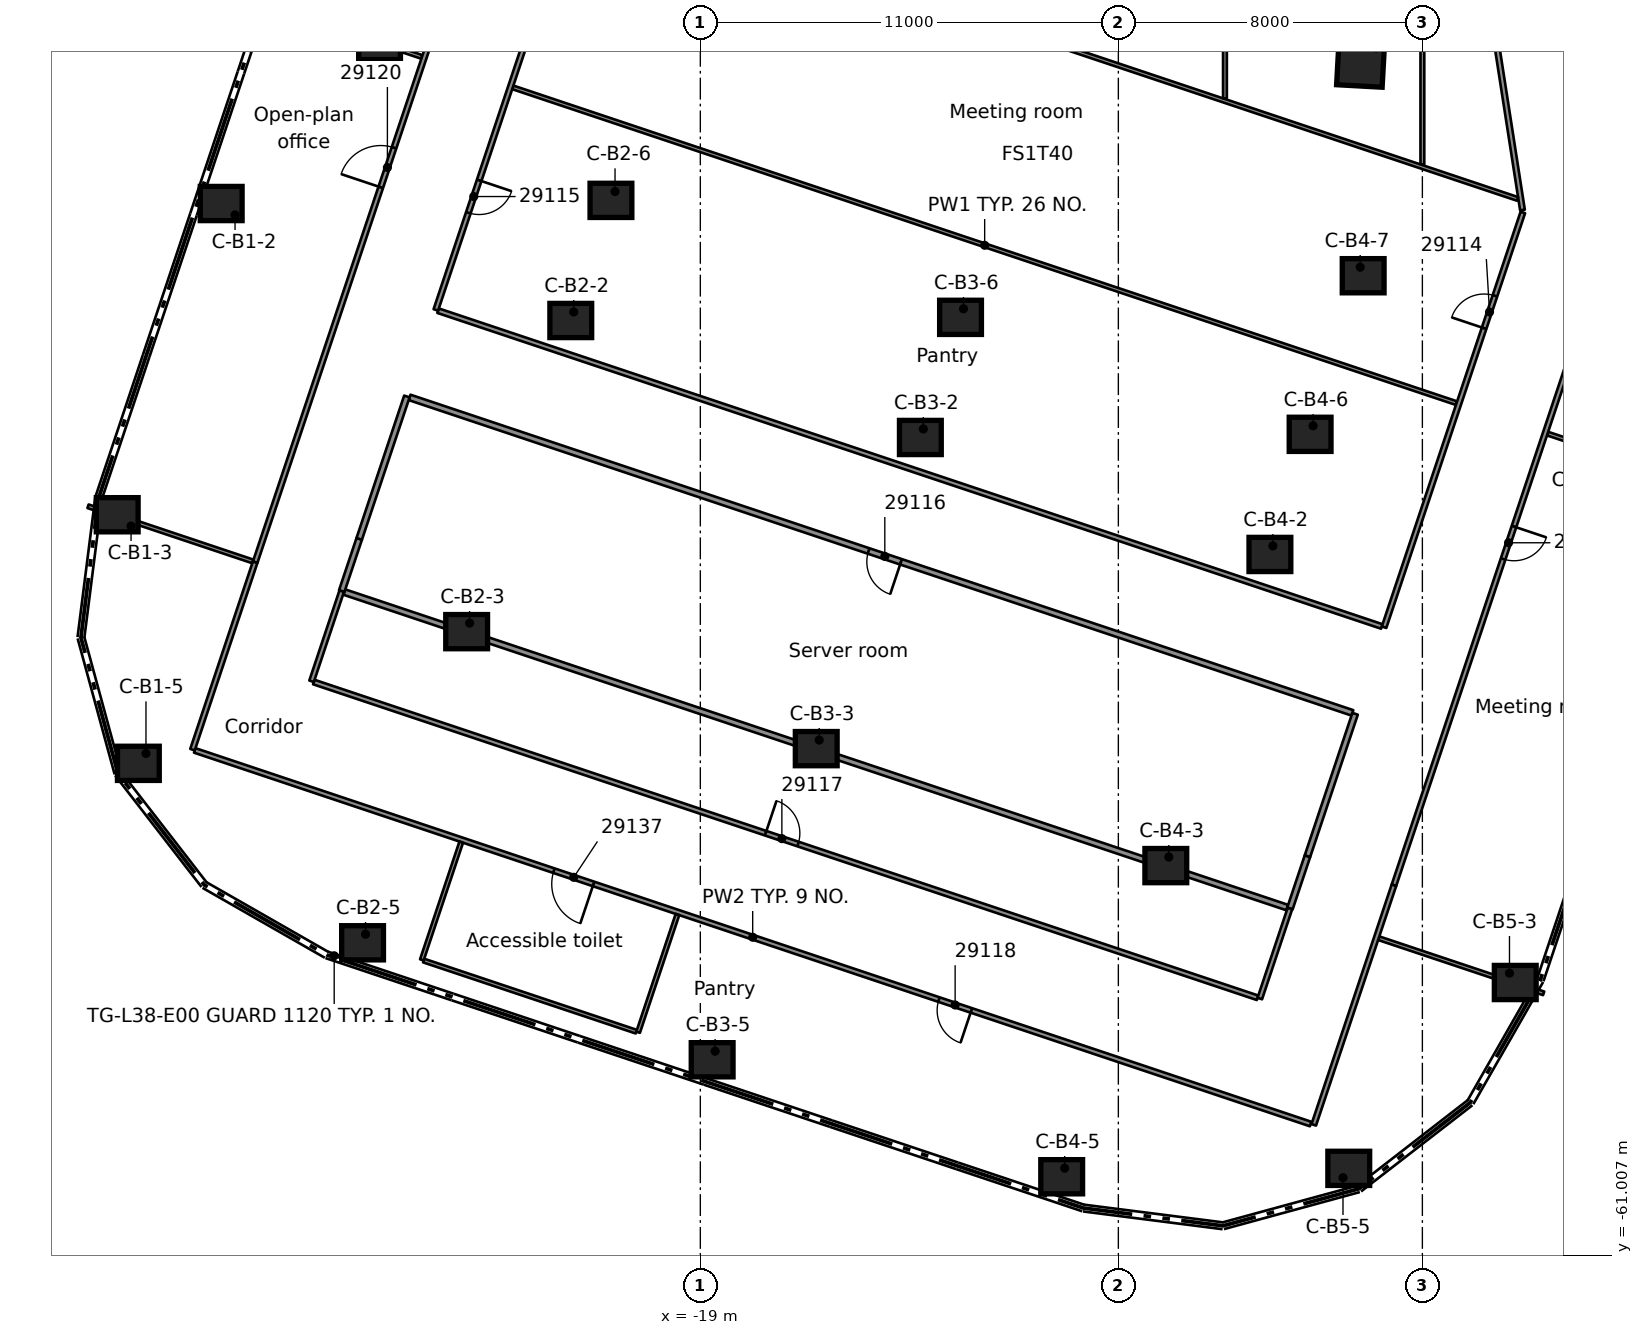
"""IFC4 building model, lengths in metres.
Left out: names, types, materials, properties, quantities, classifications, styles, units other than length and angle.
Written with IfcOpenShell. Run it as: python <this file> out.ifc"""

import sys

from ifc_helpers import new_model, si_unit, direction, frame, frame_2d, origin, origin_2d, place, context, subcontext, project, spatial, rectangle, extrude, element, fill, save


model = new_model("IFC4")
c1 = context("Model", 3, precision=1e-05, world=origin(), true_north=direction((0.0, 1.0)))
c2 = subcontext(c1, "Body", "Model", "MODEL_VIEW")
j1 = project(units=[si_unit("LENGTHUNIT", "METRE"), si_unit("PLANEANGLEUNIT", "RADIAN")], contexts=[c1])
p1 = place(None, origin())
s1 = spatial("IfcSite", under=j1, at=p1, CompositionType="ELEMENT")
p2 = place(p1, origin())
s2 = spatial("IfcBuilding", under=s1, at=p2, CompositionType="ELEMENT")
p3 = place(p2, frame((0.0, 0.0, 149.1)))
s3 = spatial("IfcBuildingStorey", under=s2, at=p3, CompositionType="ELEMENT", Elevation=149.1)
for number, where, z_axis, x_axis in (
    (1, (-31.608, -33.326, 0.0), (0.0, 0.0, 1.0), (1.0, 0.0, 0.0)),
    (2, (-34.344, -41.515, 0.0), (0.0, 0.0, 1.0), (1.0, 0.0, 0.0)),
    (3, (-33.788, -48.056, 0.0), (0.0, 0.0, 1.0), (1.0, 0.0, 0.0)),
    (4, (-27.441, -29.089, 0.0), (0.0, 0.0, 1.0), (1.0, 0.0, 0.0)),
    (5, (-22.409, -36.404, 0.0), (0.0, 0.0, 1.0), (1.0, 0.0, 0.0)),
    (6, (-25.149, -44.591, 0.0), (0.0, 0.0, 1.0), (1.0, 0.0, 0.0)),
    (7, (-27.888, -52.778, 0.0), (0.0, 0.0, 1.0), (1.0, 0.0, 0.0)),
    (8, (-21.352, -33.243, 0.0), (0.0, 0.0, 1.0), (1.0, 0.0, 0.0)),
    (9, (-13.21, -39.482, 0.0), (0.0, 0.0, 1.0), (1.0, 0.0, 0.0)),
    (10, (-15.95, -47.669, 0.0), (0.0, 0.0, 1.0), (1.0, 0.0, 0.0)),
    (11, (-18.689, -55.856, 0.0), (0.0, 0.0, 1.0), (1.0, 0.0, 0.0)),
    (12, (-12.153, -36.321, 0.0), (0.0, 0.0, 1.0), (1.0, 0.0, 0.0)),
    (13, (-4.012, -42.56, 0.0), (0.0, 0.0, 1.0), (1.0, 0.0, 0.0)),
    (14, (-6.751, -50.747, 0.0), (0.0, 0.0, 1.0), (1.0, 0.0, 0.0)),
    (15, (-9.491, -58.934, 0.0), (0.0, 0.0, 1.0), (1.0, 0.0, 0.0)),
    (16, (-2.954, -39.399, 0.0), (0.0, 0.0, 1.0), (1.0, 0.0, 0.0)),
    (17, (-1.558, -35.226, 0.0), (0.0, 0.0, 1.0), (1.0, 0.0, 0.0)),
    (18, (2.444, -53.823, 0.0), (0.0, 0.0, 1.0), (1.0, 0.0, 0.0)),
    (19, (-1.937, -58.713, 0.0), (0.0, 0.0, 1.0), (1.0, 0.0, 0.0)),
):
    element("IfcColumn", number, at=place(p3, frame(where, z_axis=z_axis, x_axis=x_axis)), inside=s3, PredefinedType="COLUMN", context=c2, shape_type="SweptSolid", body=[
        extrude(rectangle(XDim=1.1, YDim=0.9, at=origin_2d()), origin(), (0.0, 0.0, 1.0), 3.5),
    ])
p4 = place(p3, frame((-1.625, -29.634, 0.0), z_axis=(0.0, 0.0, 1.0), x_axis=(-0.054758482756, -0.998499628726, 0.0)))
e20 = element("IfcColumn", 20, at=p4, inside=s3, PredefinedType="COLUMN", context=c2, shape_type="SweptSolid", body=[
    extrude(rectangle(XDim=1.2, YDim=1.2, at=origin_2d()), origin(), (0.0, 0.0, 1.0), 3.5),
])
p5 = place(p3, frame((2.634, -33.497, 0.0), z_axis=(0.0, 0.0, 1.0), x_axis=(-0.153972826204, 0.988075082567, 0.0)))
e21 = element("IfcWall", 21, at=p5, inside=s3, PredefinedType="PARTITIONING", context=c2, shape_type="SweptSolid", body=[
    extrude(rectangle(XDim=4.424, YDim=0.125, at=frame_2d((2.212, 0.0))), origin(), (0.0, 0.0, 1.0), 3.08),
])
p6 = place(p3, frame((-26.281, -53.245, 0.0), z_axis=(0.0, 0.0, 1.0), x_axis=(0.948351779966, -0.317220587976, 0.0)))
e22 = element("IfcWall", 22, at=p6, inside=s3, PredefinedType="PARTITIONING", context=c2, shape_type="SweptSolid", body=[
    extrude(rectangle(XDim=5.901, YDim=0.1, at=frame_2d((2.95, 0.0))), origin(), (0.0, 0.0, 1.0), 3.08),
])
p7 = place(p3, frame((-2.94, -57.547, 0.0), z_axis=(0.0, 0.0, 1.0), x_axis=(-0.948265401731, 0.317478704609, 0.0)))
e23 = element("IfcWall", 23, at=p7, inside=s3, PredefinedType="PARTITIONING", context=c2, shape_type="SweptSolid", body=[
    extrude(rectangle(XDim=30.966, YDim=0.125, at=frame_2d((15.483, 0.0))), origin(), (0.0, 0.0, 1.0), 3.08),
])
p8 = place(p7, frame((9.415, 0.0, 0.0)))
e24 = element("IfcOpeningElement", 24, at=p8, cuts=e23, PredefinedType="OPENING", context=c2, shape_type="SweptSolid", body=[
    extrude(rectangle(XDim=0.9, YDim=2.1, at=frame_2d((0.45, 1.05))), frame((0.0, 0.073, 0.0), z_axis=(0.0, -1.0, 0.0), x_axis=(1.0, 0.0, 0.0)), (0.0, 0.0, 1.0), 0.145),
])
p9 = place(p7, frame((19.9, 0.0, 0.0)))
e25 = element("IfcOpeningElement", 25, at=p9, cuts=e23, PredefinedType="OPENING", context=c2, shape_type="SweptSolid", body=[
    extrude(rectangle(XDim=1.1, YDim=2.1, at=frame_2d((0.55, 1.05))), frame((0.0, 0.073, 0.0), z_axis=(0.0, -1.0, 0.0), x_axis=(1.0, 0.0, 0.0)), (0.0, 0.0, 1.0), 0.145),
])
p10 = place(p3, frame((-29.171, -45.917, 0.0), z_axis=(0.0, 0.0, 1.0), x_axis=(0.948337781815, -0.317262433299, 0.0)))
e26 = element("IfcWall", 26, at=p10, inside=s3, PredefinedType="PARTITIONING", context=c2, shape_type="SweptSolid", body=[
    extrude(rectangle(XDim=26.187, YDim=0.125, at=frame_2d((13.093, 0.0))), origin(), (0.0, 0.0, 1.0), 3.08),
])
p11 = place(p10, frame((12.538, 0.0, 0.0)))
e27 = element("IfcOpeningElement", 27, at=p11, cuts=e26, PredefinedType="OPENING", context=c2, shape_type="SweptSolid", body=[
    extrude(rectangle(XDim=0.9, YDim=2.1, at=frame_2d((0.45, 1.05))), frame((0.0, 0.073, 0.0), z_axis=(0.0, -1.0, 0.0), x_axis=(1.0, 0.0, 0.0)), (0.0, 0.0, 1.0), 0.145),
])
p12 = place(p3, frame((-35.112, -41.292, 0.0), z_axis=(0.0, 0.0, 1.0), x_axis=(0.94831984375, -0.317316047419, 0.0)))
e28 = element("IfcWall", 28, at=p12, inside=s3, PredefinedType="PARTITIONING", context=c2, shape_type="SweptSolid", body=[
    extrude(rectangle(XDim=4.576, YDim=0.1, at=frame_2d((2.288, 0.0))), origin(), (0.0, 0.0, 1.0), 3.08),
])
p13 = place(p3, frame((-28.366, -43.55, 0.0), z_axis=(0.0, 0.0, 1.0), x_axis=(0.948327152728, -0.317294203223, 0.0)))
e29 = element("IfcWall", 29, at=p13, inside=s3, PredefinedType="PARTITIONING", context=c2, shape_type="SweptSolid", body=[
    extrude(rectangle(XDim=26.162, YDim=0.15, at=frame_2d((13.081, 0.0))), origin(), (0.0, 0.0, 1.0), 3.08),
])
p14 = place(p3, frame((-1.149, -52.657, 0.0), z_axis=(0.0, 0.0, 1.0), x_axis=(0.948400148701, -0.317075949805, 0.0)))
e30 = element("IfcWall", 30, at=p14, inside=s3, PredefinedType="PARTITIONING", context=c2, shape_type="SweptSolid", body=[
    extrude(rectangle(XDim=4.576, YDim=0.1, at=frame_2d((2.288, 0.0))), origin(), (0.0, 0.0, 1.0), 3.08),
])
p15 = place(p3, frame((-1.841, -46.728, 0.0), z_axis=(0.0, 0.0, 1.0), x_axis=(-0.94832621322, 0.317297011205, 0.0)))
e31 = element("IfcWall", 31, at=p15, inside=s3, PredefinedType="PARTITIONING", context=c2, shape_type="SweptSolid", body=[
    extrude(rectangle(XDim=26.162, YDim=0.15, at=frame_2d((13.081, 0.0))), origin(), (0.0, 0.0, 1.0), 3.08),
])
p16 = place(p15, frame((12.525, 0.0, 0.0)))
e32 = element("IfcOpeningElement", 32, at=p16, cuts=e31, PredefinedType="OPENING", context=c2, shape_type="SweptSolid", body=[
    extrude(rectangle(XDim=0.9, YDim=2.1, at=frame_2d((0.45, 1.05))), frame((0.0, 0.085, 0.0), z_axis=(0.0, -1.0, 0.0), x_axis=(1.0, 0.0, 0.0)), (0.0, 0.0, 1.0), 0.17),
])
p17 = place(p3, frame((-25.901, -36.146, 0.0), z_axis=(0.0, 0.0, 1.0), x_axis=(0.948326561211, -0.317295971139, 0.0)))
e33 = element("IfcWall", 33, at=p17, inside=s3, PredefinedType="PARTITIONING", context=c2, shape_type="SweptSolid", body=[
    extrude(rectangle(XDim=26.187, YDim=0.125, at=frame_2d((13.094, 0.0))), origin(), (0.0, 0.0, 1.0), 3.08),
])
p18 = place(p3, frame((-30.722, -27.999, 0.0), z_axis=(0.0, 0.0, 1.0), x_axis=(0.948355935611, -0.317208164132, 0.0)))
e34 = element("IfcWall", 34, at=p18, inside=s3, PredefinedType="PARTITIONING", context=c2, shape_type="SweptSolid", body=[
    extrude(rectangle(XDim=4.631, YDim=0.1, at=frame_2d((2.315, 0.0))), origin(), (0.0, 0.0, 1.0), 3.08),
])
p19 = place(p3, frame((-23.935, -30.27, 0.0), z_axis=(0.0, 0.0, 1.0), x_axis=(0.948326561211, -0.317295971139, 0.0)))
e35 = element("IfcWall", 35, at=p19, inside=s3, PredefinedType="PARTITIONING", context=c2, shape_type="SweptSolid", body=[
    extrude(rectangle(XDim=26.187, YDim=0.1, at=frame_2d((13.094, 0.0))), origin(), (0.0, 0.0, 1.0), 3.08),
])
p20 = place(p3, frame((3.294, -39.38, 0.0), z_axis=(0.0, 0.0, 1.0), x_axis=(0.948260676976, -0.317492816455, 0.0)))
e36 = element("IfcWall", 36, at=p20, inside=s3, PredefinedType="PARTITIONING", context=c2, shape_type="SweptSolid", body=[
    extrude(rectangle(XDim=4.631, YDim=0.1, at=frame_2d((2.315, 0.0))), origin(), (0.0, 0.0, 1.0), 3.08),
])
p21 = place(p3, frame((-21.98, -25.012, 0.0), z_axis=(0.0, 0.0, 1.0), x_axis=(0.948312916699, -0.317336748614, 0.0)))
e37 = element("IfcWall", 37, at=p21, inside=s3, PredefinedType="PARTITIONING", context=c2, shape_type="SweptSolid", body=[
    extrude(rectangle(XDim=25.818, YDim=0.1, at=frame_2d((12.909, 0.0))), origin(), (0.0, 0.0, 1.0), 3.08),
])
p22 = place(p3, frame((-2.858, -57.568, 0.0), z_axis=(0.0, 0.0, 1.0), x_axis=(0.317328623894, 0.94831563546, 0.0)))
e38 = element("IfcWall", 38, at=p22, inside=s3, PredefinedType="PARTITIONING", context=c2, shape_type="SweptSolid", body=[
    extrude(rectangle(XDim=6.652, YDim=0.125, at=frame_2d((3.326, 0.0))), origin(), (0.0, 0.0, 1.0), 3.08),
])
p23 = place(p3, frame((5.014, -34.047, 0.0), z_axis=(0.0, 0.0, 1.0), x_axis=(-0.317385597106, -0.948296568986, 0.0)))
e39 = element("IfcWall", 39, at=p23, inside=s3, PredefinedType="PARTITIONING", context=c2, shape_type="SweptSolid", body=[
    extrude(rectangle(XDim=18.151, YDim=0.125, at=frame_2d((9.076, 0.0))), origin(), (0.0, 0.0, 1.0), 3.08),
])
p24 = place(p23, frame((2.347, 0.0, 0.0)))
e40 = element("IfcOpeningElement", 40, at=p24, cuts=e39, PredefinedType="OPENING", context=c2, shape_type="SweptSolid", body=[
    extrude(rectangle(XDim=0.9, YDim=2.1, at=frame_2d((0.45, 1.05))), frame((0.0, 0.073, 0.0), z_axis=(0.0, -1.0, 0.0), x_axis=(1.0, 0.0, 0.0)), (0.0, 0.0, 1.0), 0.145),
])
p25 = place(p23, frame((8.203, 0.0, 0.0)))
e41 = element("IfcOpeningElement", 41, at=p25, cuts=e39, PredefinedType="OPENING", context=c2, shape_type="SweptSolid", body=[
    extrude(rectangle(XDim=0.9, YDim=2.1, at=frame_2d((0.45, 1.05))), frame((0.0, 0.073, 0.0), z_axis=(0.0, -1.0, 0.0), x_axis=(1.0, 0.0, 0.0)), (0.0, 0.0, 1.0), 0.145),
])
p26 = place(p3, frame((-3.485, -51.875, 0.0), z_axis=(0.0, 0.0, 1.0), x_axis=(0.317791901712, 0.948160485997, 0.0)))
e42 = element("IfcWall", 42, at=p26, inside=s3, PredefinedType="PARTITIONING", context=c2, shape_type="SweptSolid", body=[
    extrude(rectangle(XDim=1.451, YDim=0.15, at=frame_2d((0.726, 0.0))), origin(), (0.0, 0.0, 1.0), 3.08),
])
p27 = place(p3, frame((-4.278, -54.245, 0.0), z_axis=(0.0, 0.0, 1.0), x_axis=(0.31728257411, 0.948331043553, 0.0)))
e43 = element("IfcWall", 43, at=p27, inside=s3, PredefinedType="PARTITIONING", context=c2, shape_type="SweptSolid", body=[
    extrude(rectangle(XDim=2.499, YDim=0.125, at=frame_2d((1.25, 0.0))), origin(), (0.0, 0.0, 1.0), 3.08),
])
p28 = place(p3, frame((-3.024, -50.499, 0.0), z_axis=(0.0, 0.0, 1.0), x_axis=(0.317339720629, 0.94831192216, 0.0)))
e44 = element("IfcWall", 44, at=p28, inside=s3, PredefinedType="PARTITIONING", context=c2, shape_type="SweptSolid", body=[
    extrude(rectangle(XDim=3.951, YDim=0.15, at=frame_2d((1.976, 0.0))), origin(), (0.0, 0.0, 1.0), 3.08),
])
p29 = place(p3, frame((-1.008, -44.475, 0.0), z_axis=(0.0, 0.0, 1.0), x_axis=(0.317302986419, 0.948324213974, 0.0)))
e45 = element("IfcWall", 45, at=p29, inside=s3, PredefinedType="PARTITIONING", context=c2, shape_type="SweptSolid", body=[
    extrude(rectangle(XDim=11.51, YDim=0.125, at=frame_2d((5.755, 0.0))), origin(), (0.0, 0.0, 1.0), 3.08),
])
p30 = place(p29, frame((8.296, 0.0, 0.0)))
e46 = element("IfcOpeningElement", 46, at=p30, cuts=e45, PredefinedType="OPENING", context=c2, shape_type="SweptSolid", body=[
    extrude(rectangle(XDim=0.9, YDim=2.1, at=frame_2d((0.45, 1.05))), frame((0.0, 0.073, 0.0), z_axis=(0.0, -1.0, 0.0), x_axis=(1.0, 0.0, 0.0)), (0.0, 0.0, 1.0), 0.145),
])
p31 = place(p3, frame((-20.637, -55.132, 0.0), z_axis=(0.0, 0.0, 1.0), x_axis=(0.316922325985, 0.948451495487, 0.0)))
e47 = element("IfcWall", 47, at=p31, inside=s3, PredefinedType="PARTITIONING", context=c2, shape_type="SweptSolid", body=[
    extrude(rectangle(XDim=3.269, YDim=0.1, at=frame_2d((1.634, 0.0))), origin(), (0.0, 0.0, 1.0), 3.08),
])
p32 = place(p3, frame((-26.328, -53.228, 0.0), z_axis=(0.0, 0.0, 1.0), x_axis=(0.317191051156, 0.948361659425, 0.0)))
e48 = element("IfcWall", 48, at=p32, inside=s3, PredefinedType="PARTITIONING", context=c2, shape_type="SweptSolid", body=[
    extrude(rectangle(XDim=3.269, YDim=0.1, at=frame_2d((1.634, 0.0))), origin(), (0.0, 0.0, 1.0), 3.08),
])
p33 = place(p3, frame((-28.437, -43.526, 0.0), z_axis=(0.0, 0.0, 1.0), x_axis=(0.317640646832, 0.94821116819, 0.0)))
e49 = element("IfcWall", 49, at=p33, inside=s3, PredefinedType="PARTITIONING", context=c2, shape_type="SweptSolid", body=[
    extrude(rectangle(XDim=1.451, YDim=0.15, at=frame_2d((0.726, 0.0))), origin(), (0.0, 0.0, 1.0), 3.08),
])
p34 = place(p3, frame((-27.976, -42.15, 0.0), z_axis=(0.0, 0.0, 1.0), x_axis=(0.317413881712, 0.948287101935, 0.0)))
e50 = element("IfcWall", 50, at=p34, inside=s3, PredefinedType="PARTITIONING", context=c2, shape_type="SweptSolid", body=[
    extrude(rectangle(XDim=3.951, YDim=0.15, at=frame_2d((1.976, 0.0))), origin(), (0.0, 0.0, 1.0), 3.08),
])
p35 = place(p3, frame((-22.308, -25.211, 0.0), z_axis=(0.0, 0.0, 1.0), x_axis=(-0.317283910316, -0.948330596498, 0.0)))
e51 = element("IfcWall", 51, at=p35, inside=s3, PredefinedType="PARTITIONING", context=c2, shape_type="SweptSolid", body=[
    extrude(rectangle(XDim=11.51, YDim=0.125, at=frame_2d((5.755, 0.0))), origin(), (0.0, 0.0, 1.0), 3.08),
])
p36 = place(p35, frame((2.1, 0.0, 0.0)))
e52 = element("IfcOpeningElement", 52, at=p36, cuts=e51, PredefinedType="OPENING", context=c2, shape_type="SweptSolid", body=[
    extrude(rectangle(XDim=0.9, YDim=2.1, at=frame_2d((0.45, 1.05))), frame((0.0, 0.073, 0.0), z_axis=(0.0, -1.0, 0.0), x_axis=(1.0, 0.0, 0.0)), (0.0, 0.0, 1.0), 0.145),
])
p37 = place(p35, frame((7.914, 0.0, 0.0)))
e53 = element("IfcOpeningElement", 53, at=p37, cuts=e51, PredefinedType="OPENING", context=c2, shape_type="SweptSolid", body=[
    extrude(rectangle(XDim=0.9, YDim=2.1, at=frame_2d((0.45, 1.05))), frame((0.0, 0.073, 0.0), z_axis=(0.0, -1.0, 0.0), x_axis=(1.0, 0.0, 0.0)), (0.0, 0.0, 1.0), 0.145),
])
p38 = place(p3, frame((-29.23, -45.897, 0.0), z_axis=(0.0, 0.0, 1.0), x_axis=(0.317165045262, 0.948370357015, 0.0)))
e54 = element("IfcWall", 54, at=p38, inside=s3, PredefinedType="PARTITIONING", context=c2, shape_type="SweptSolid", body=[
    extrude(rectangle(XDim=2.5, YDim=0.125, at=frame_2d((1.25, 0.0))), origin(), (0.0, 0.0, 1.0), 3.08),
])
p39 = place(p3, frame((-30.714, -42.764, 0.0), z_axis=(0.0, 0.0, 1.0), x_axis=(0.317699123241, 0.94819157721, 0.0)))
e55 = element("IfcWall", 55, at=p39, inside=s3, PredefinedType="PARTITIONING", context=c2, shape_type="SweptSolid", body=[
    extrude(rectangle(XDim=19.906, YDim=0.125, at=frame_2d((9.953, 0.0))), origin(), (0.0, 0.0, 1.0), 3.08),
])
p40 = place(p39, frame((16.35, 0.0, 0.0)))
e56 = element("IfcOpeningElement", 56, at=p40, cuts=e55, PredefinedType="OPENING", context=c2, shape_type="SweptSolid", body=[
    extrude(rectangle(XDim=1.0, YDim=2.1, at=frame_2d((0.5, 1.05))), frame((0.0, 0.073, 0.0), z_axis=(0.0, -1.0, 0.0), x_axis=(1.0, 0.0, 0.0)), (0.0, 0.0, 1.0), 0.145),
])
p41 = place(p39, frame((10.403, 0.0, 0.0)))
e57 = element("IfcOpeningElement", 57, at=p41, cuts=e55, PredefinedType="OPENING", context=c2, shape_type="SweptSolid", body=[
    extrude(rectangle(XDim=1.1, YDim=2.1, at=frame_2d((0.55, 1.05))), frame((0.0, 0.073, 0.0), z_axis=(0.0, -1.0, 0.0), x_axis=(1.0, 0.0, 0.0)), (0.0, 0.0, 1.0), 0.145),
])
p42 = place(p3, frame((-30.715, -42.765, 0.0), z_axis=(0.0, 0.0, 1.0), x_axis=(-0.31696020199, -0.948438838489, 0.0)))
e58 = element("IfcWall", 58, at=p42, inside=s3, PredefinedType="PARTITIONING", context=c2, shape_type="SweptSolid", body=[
    extrude(rectangle(XDim=5.199, YDim=0.125, at=frame_2d((2.6, 0.0))), origin(), (0.0, 0.0, 1.0), 3.08),
])
p43 = place(p3, frame((0.0, -32.297, 0.0), z_axis=(0.0, 0.0, 1.0), x_axis=(0.0, 1.0, 0.0)))
e59 = element("IfcWall", 59, at=p43, inside=s3, PredefinedType="PARTITIONING", context=c2, shape_type="SweptSolid", body=[
    extrude(rectangle(XDim=17.834, YDim=0.1, at=frame_2d((8.917, 0.0))), origin(), (0.0, 0.0, 1.0), 3.08),
])
p44 = place(p3, frame((-5.195, -30.559, 0.0), z_axis=(0.0, 0.0, 1.0), x_axis=(0.0, 1.0, 0.0)))
e60 = element("IfcWall", 60, at=p44, inside=s3, PredefinedType="PARTITIONING", context=c2, shape_type="SweptSolid", body=[
    extrude(rectangle(XDim=16.096, YDim=0.1, at=frame_2d((8.048, 0.0))), origin(), (0.0, 0.0, 1.0), 3.08),
])
p45 = place(p25, origin())
e61 = element("IfcDoor", 61, at=p45, inside=s3, OperationType="SINGLE_SWING_LEFT", PredefinedType="DOOR", context=c2, shape_type="SweptSolid", body=[
    extrude(rectangle(XDim=0.9, YDim=2.1, at=frame_2d((0.45, 1.05))), frame((0.0, 0.025, 0.0), z_axis=(0.0, -1.0, 0.0), x_axis=(1.0, 0.0, 0.0)), (0.0, 0.0, 1.0), 0.05),
])
fill(e41, e61)
p46 = place(p30, origin())
e62 = element("IfcDoor", 62, at=p46, inside=s3, OperationType="SINGLE_SWING_RIGHT", PredefinedType="DOOR", context=c2, shape_type="SweptSolid", body=[
    extrude(rectangle(XDim=0.9, YDim=2.1, at=frame_2d((0.45, 1.05))), frame((0.0, 0.025, 0.0), z_axis=(0.0, -1.0, 0.0), x_axis=(1.0, 0.0, 0.0)), (0.0, 0.0, 1.0), 0.05),
])
fill(e46, e62)
p47 = place(p37, origin())
e63 = element("IfcDoor", 63, at=p47, inside=s3, OperationType="SINGLE_SWING_RIGHT", PredefinedType="DOOR", context=c2, shape_type="SweptSolid", body=[
    extrude(rectangle(XDim=0.9, YDim=2.1, at=frame_2d((0.45, 1.05))), frame((0.0, 0.025, 0.0), z_axis=(0.0, -1.0, 0.0), x_axis=(1.0, 0.0, 0.0)), (0.0, 0.0, 1.0), 0.05),
])
fill(e53, e63)
p48 = place(p16, origin())
e64 = element("IfcDoor", 64, at=p48, inside=s3, OperationType="SINGLE_SWING_LEFT", PredefinedType="DOOR", context=c2, shape_type="SweptSolid", body=[
    extrude(rectangle(XDim=0.9, YDim=2.1, at=frame_2d((0.45, 1.05))), frame((0.0, 0.025, 0.0), z_axis=(0.0, -1.0, 0.0), x_axis=(1.0, 0.0, 0.0)), (0.0, 0.0, 1.0), 0.05),
])
fill(e32, e64)
p49 = place(p11, origin())
e65 = element("IfcDoor", 65, at=p49, inside=s3, OperationType="SINGLE_SWING_LEFT", PredefinedType="DOOR", context=c2, shape_type="SweptSolid", body=[
    extrude(rectangle(XDim=0.9, YDim=2.1, at=frame_2d((0.45, 1.05))), frame((0.0, 0.025, 0.0), z_axis=(0.0, -1.0, 0.0), x_axis=(1.0, 0.0, 0.0)), (0.0, 0.0, 1.0), 0.05),
])
fill(e27, e65)
p50 = place(p8, origin())
e66 = element("IfcDoor", 66, at=p50, inside=s3, OperationType="SINGLE_SWING_LEFT", PredefinedType="DOOR", context=c2, shape_type="SweptSolid", body=[
    extrude(rectangle(XDim=0.9, YDim=2.1, at=frame_2d((0.45, 1.05))), frame((0.0, 0.025, 0.0), z_axis=(0.0, -1.0, 0.0), x_axis=(1.0, 0.0, 0.0)), (0.0, 0.0, 1.0), 0.05),
])
fill(e24, e66)
p51 = place(p41, origin())
e67 = element("IfcDoor", 67, at=p51, inside=s3, OperationType="SINGLE_SWING_RIGHT", PredefinedType="DOOR", context=c2, shape_type="SweptSolid", body=[
    extrude(rectangle(XDim=1.1, YDim=2.1, at=frame_2d((0.55, 1.05))), frame((0.0, 0.025, 0.0), z_axis=(0.0, -1.0, 0.0), x_axis=(1.0, 0.0, 0.0)), (0.0, 0.0, 1.0), 0.05),
])
fill(e57, e67)
p52 = place(p9, origin())
e68 = element("IfcDoor", 68, at=p52, inside=s3, OperationType="SINGLE_SWING_RIGHT", PredefinedType="DOOR", context=c2, shape_type="SweptSolid", body=[
    extrude(rectangle(XDim=1.1, YDim=2.1, at=frame_2d((0.55, 1.05))), frame((0.0, 0.025, 0.0), z_axis=(0.0, -1.0, 0.0), x_axis=(1.0, 0.0, 0.0)), (0.0, 0.0, 1.0), 0.05),
])
fill(e25, e68)
save(model, sys.argv[1])
